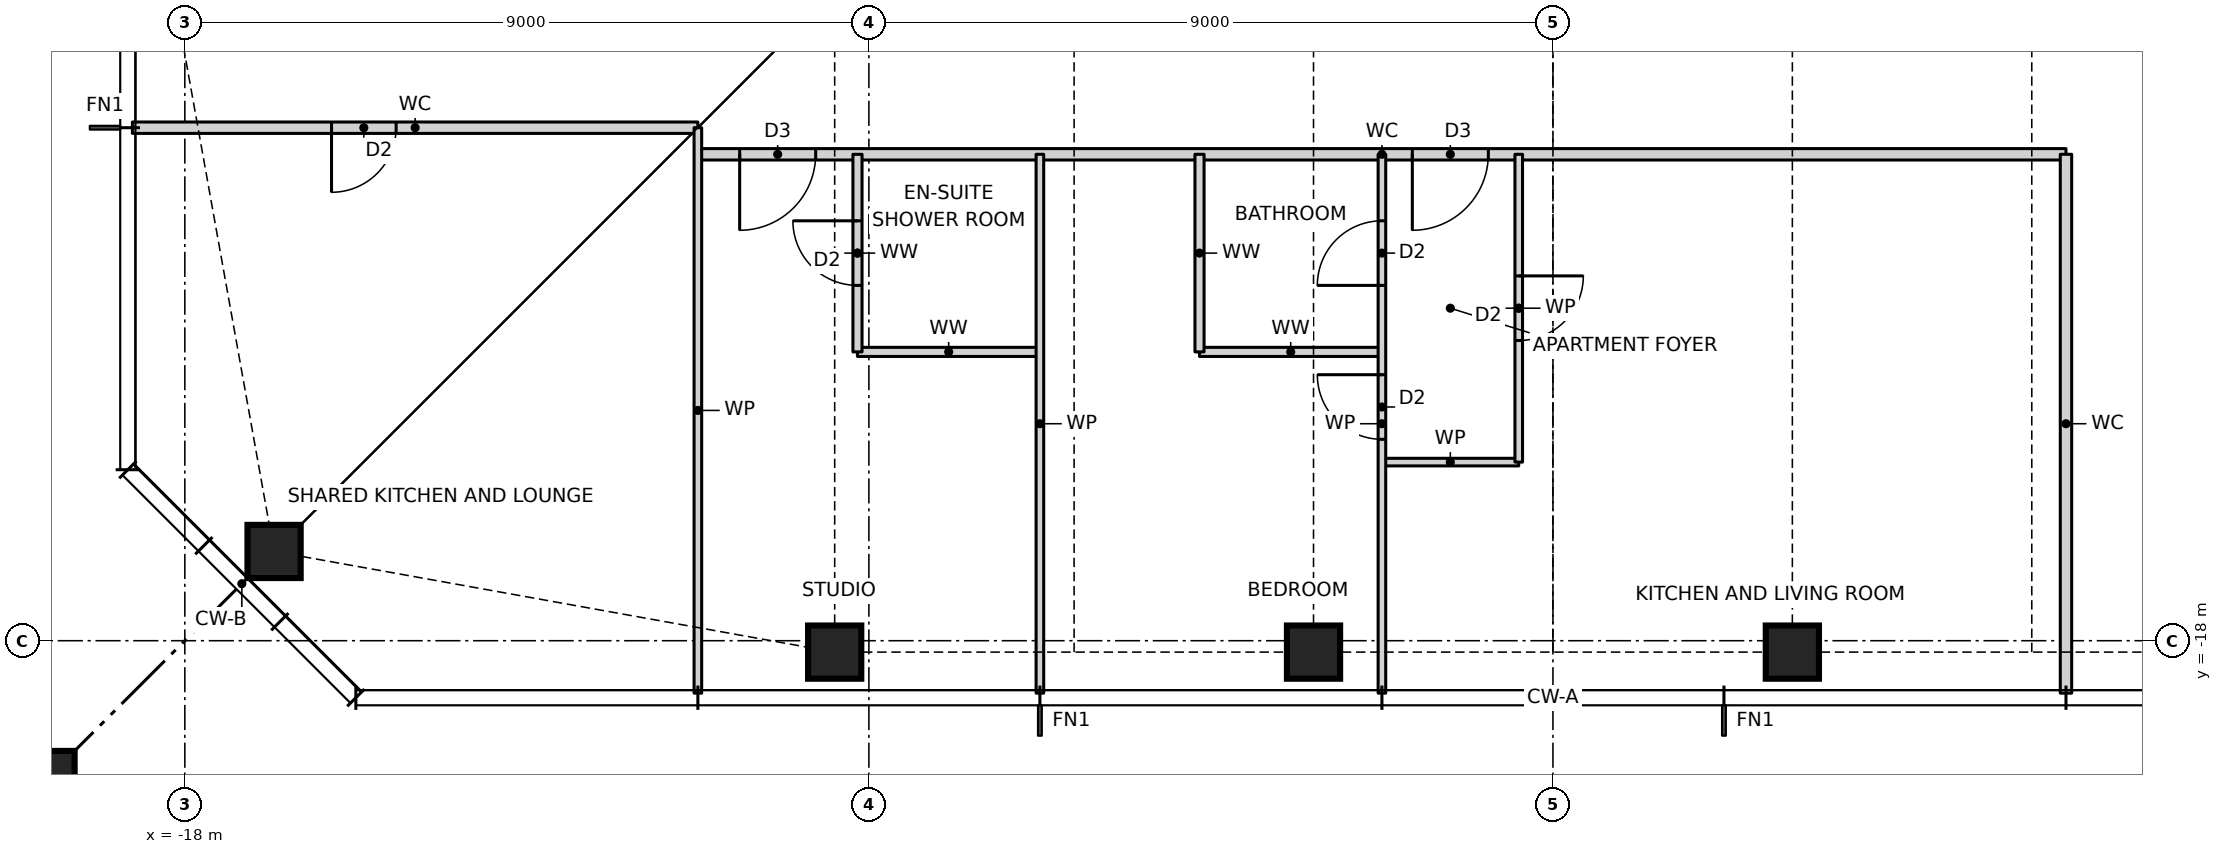
"""IFC4 building model, lengths in metres.
Left out: names, types, materials, properties, quantities, classifications, styles, units other than length and angle.
Written with IfcOpenShell. Run it as: python <this file> out.ifc"""

import sys

from ifc_helpers import new_model, si_unit, direction, frame, frame_2d, origin, origin_2d, place, context, subcontext, project, spatial, rectangle, hollow_rectangle, i_section, extrude, element, fill, save


model = new_model("IFC4")
c1 = context("Model", 3, precision=1e-05, world=origin(), true_north=direction((0.0, 1.0)))
c2 = subcontext(c1, "Body", "Model", "MODEL_VIEW")
j1 = project(units=[si_unit("LENGTHUNIT", "METRE"), si_unit("PLANEANGLEUNIT", "RADIAN")], contexts=[c1])
p1 = place(None, origin())
s1 = spatial("IfcSite", under=j1, at=p1, CompositionType="ELEMENT")
p2 = place(p1, origin())
s2 = spatial("IfcBuilding", under=s1, at=p2, CompositionType="ELEMENT")
p3 = place(p2, frame((0.0, 0.0, 191.5)))
s3 = spatial("IfcBuildingStorey", under=s2, at=p3, CompositionType="ELEMENT", Elevation=191.5)
for number, where, z_axis, x_axis in (
    (1, (-16.826, -16.826, 0.0), (0.0, 0.0, 1.0), (1.0, 0.0, 0.0)),
    (2, (-9.45, -18.15, 0.0), (0.0, 0.0, 1.0), (1.0, 0.0, 0.0)),
    (3, (-3.15, -18.15, 0.0), (0.0, 0.0, 1.0), (1.0, 0.0, 0.0)),
    (4, (3.15, -18.15, 0.0), (0.0, 0.0, 1.0), (1.0, 0.0, 0.0)),
):
    element("IfcColumn", number, at=place(p3, frame(where, z_axis=z_axis, x_axis=x_axis)), inside=s3, PredefinedType="COLUMN", context=c2, shape_type="SweptSolid", body=[
        extrude(hollow_rectangle(XDim=0.7, YDim=0.7, WallThickness=0.06, at=origin_2d()), origin(), (0.0, 0.0, 1.0), 3.5),
    ])
p4 = place(p3, frame((-21.65, -21.65, 0.0), z_axis=(0.0, 0.0, 1.0), x_axis=(1.0, 0.0, 0.0)))
e5 = element("IfcColumn", 5, at=p4, inside=s3, PredefinedType="COLUMN", context=c2, shape_type="SweptSolid", body=[
    extrude(rectangle(XDim=4.4, YDim=4.4, at=origin_2d()), origin(), (0.0, 0.0, 1.0), 3.5),
    extrude(i_section(OverallWidth=0.478, OverallDepth=0.599, WebThickness=0.1, FlangeThickness=0.14, at=origin_2d()), origin(), (0.0, 0.0, 1.0), 3.5),
])
p5 = place(p3, frame((-2.25, -15.65, 0.0), z_axis=(0.0, 0.0, 1.0), x_axis=(1.0, 0.0, 0.0)))
e6 = element("IfcWall", 6, at=p5, inside=s3, PredefinedType="PARTITIONING", context=c2, shape_type="SweptSolid", body=[
    extrude(rectangle(XDim=1.8, YDim=0.1, at=frame_2d((0.9, 0.0))), origin(), (0.0, 0.0, 1.0), 3.27),
])
for number, where, z_axis, x_axis in (
    (7, (-9.15, -14.2, 0.0), (0.0, 0.0, 1.0), (1.0, 0.0, 0.0)),
    (8, (-4.65, -14.2, 0.0), (0.0, 0.0, 1.0), (1.0, 0.0, 0.0)),
):
    element("IfcWall", number, at=place(p3, frame(where, z_axis=z_axis, x_axis=x_axis)), inside=s3, PredefinedType="PARTITIONING", context=c2, shape_type="SweptSolid", body=[
        extrude(rectangle(XDim=2.4, YDim=0.12, at=frame_2d((1.2, 0.0))), origin(), (0.0, 0.0, 1.0), 3.27),
    ])
p6 = place(p3, frame((-11.25, -11.6, 0.0), z_axis=(0.0, 0.0, 1.0), x_axis=(1.0, 0.0, 0.0)))
e9 = element("IfcWall", 9, at=p6, inside=s3, PredefinedType="PARTITIONING", context=c2, shape_type="SweptSolid", body=[
    extrude(rectangle(XDim=18.0, YDim=0.15, at=frame_2d((9.0, 0.0))), origin(), (0.0, 0.0, 1.0), 3.27),
])
p7 = place(p6, frame((0.55, 0.0, 0.0)))
e10 = element("IfcOpeningElement", 10, at=p7, cuts=e9, PredefinedType="OPENING", context=c2, shape_type="SweptSolid", body=[
    extrude(rectangle(XDim=1.0, YDim=2.1, at=frame_2d((0.5, 1.05))), frame((0.0, 0.085, 0.0), z_axis=(0.0, -1.0, 0.0), x_axis=(1.0, 0.0, 0.0)), (0.0, 0.0, 1.0), 0.17),
])
p8 = place(p6, frame((9.4, 0.0, 0.0)))
e11 = element("IfcOpeningElement", 11, at=p8, cuts=e9, PredefinedType="OPENING", context=c2, shape_type="SweptSolid", body=[
    extrude(rectangle(XDim=1.0, YDim=2.1, at=frame_2d((0.5, 1.05))), frame((0.0, 0.085, 0.0), z_axis=(0.0, -1.0, 0.0), x_axis=(1.0, 0.0, 0.0)), (0.0, 0.0, 1.0), 0.17),
])
p9 = place(p3, frame((-18.69, -11.25, 0.0), z_axis=(0.0, 0.0, 1.0), x_axis=(1.0, 0.0, 0.0)))
e12 = element("IfcWall", 12, at=p9, inside=s3, PredefinedType="PARTITIONING", context=c2, shape_type="SweptSolid", body=[
    extrude(rectangle(XDim=7.44, YDim=0.15, at=frame_2d((3.72, 0.0))), origin(), (0.0, 0.0, 1.0), 3.27),
])
p10 = place(p9, frame((2.62, 0.0, 0.0)))
e13 = element("IfcOpeningElement", 13, at=p10, cuts=e12, PredefinedType="OPENING", context=c2, shape_type="SweptSolid", body=[
    extrude(rectangle(XDim=0.85, YDim=2.1, at=frame_2d((0.425, 1.05))), frame((0.0, 0.085, 0.0), z_axis=(0.0, -1.0, 0.0), x_axis=(1.0, 0.0, 0.0)), (0.0, 0.0, 1.0), 0.17),
])
p11 = place(p3, frame((6.75, -18.69, 0.0), z_axis=(0.0, 0.0, 1.0), x_axis=(0.0, 1.0, 0.0)))
e14 = element("IfcWall", 14, at=p11, inside=s3, PredefinedType="PARTITIONING", context=c2, shape_type="SweptSolid", body=[
    extrude(rectangle(XDim=7.09, YDim=0.15, at=frame_2d((3.545, 0.0))), origin(), (0.0, 0.0, 1.0), 3.27),
])
p12 = place(p3, frame((-0.45, -15.65, 0.0), z_axis=(0.0, 0.0, 1.0), x_axis=(0.0, 1.0, 0.0)))
e15 = element("IfcWall", 15, at=p12, inside=s3, PredefinedType="PARTITIONING", context=c2, shape_type="SweptSolid", body=[
    extrude(rectangle(XDim=4.05, YDim=0.1, at=frame_2d((2.025, 0.0))), origin(), (0.0, 0.0, 1.0), 3.27),
])
p13 = place(p12, frame((1.6, 0.0, 0.0)))
e16 = element("IfcOpeningElement", 16, at=p13, cuts=e15, PredefinedType="OPENING", context=c2, shape_type="SweptSolid", body=[
    extrude(rectangle(XDim=0.85, YDim=2.1, at=frame_2d((0.425, 1.05))), frame((0.0, 0.06, 0.0), z_axis=(0.0, -1.0, 0.0), x_axis=(1.0, 0.0, 0.0)), (0.0, 0.0, 1.0), 0.12),
])
p14 = place(p3, frame((-2.25, -18.69, 0.0), z_axis=(0.0, 0.0, 1.0), x_axis=(0.0, 1.0, 0.0)))
e17 = element("IfcWall", 17, at=p14, inside=s3, PredefinedType="PARTITIONING", context=c2, shape_type="SweptSolid", body=[
    extrude(rectangle(XDim=7.09, YDim=0.1, at=frame_2d((3.545, 0.0))), origin(), (0.0, 0.0, 1.0), 3.27),
])
p15 = place(p14, frame((3.34, 0.0, 0.0)))
e18 = element("IfcOpeningElement", 18, at=p15, cuts=e17, PredefinedType="OPENING", context=c2, shape_type="SweptSolid", body=[
    extrude(rectangle(XDim=0.85, YDim=2.1, at=frame_2d((0.425, 1.05))), frame((0.0, 0.06, 0.0), z_axis=(0.0, -1.0, 0.0), x_axis=(1.0, 0.0, 0.0)), (0.0, 0.0, 1.0), 0.12),
])
p16 = place(p14, frame((5.365, 0.0, 0.0)))
e19 = element("IfcOpeningElement", 19, at=p16, cuts=e17, PredefinedType="OPENING", context=c2, shape_type="SweptSolid", body=[
    extrude(rectangle(XDim=0.85, YDim=2.1, at=frame_2d((0.425, 1.05))), frame((0.0, 0.06, 0.0), z_axis=(0.0, -1.0, 0.0), x_axis=(1.0, 0.0, 0.0)), (0.0, 0.0, 1.0), 0.12),
])
p17 = place(p3, frame((-4.65, -14.2, 0.0), z_axis=(0.0, 0.0, 1.0), x_axis=(0.0, 1.0, 0.0)))
e20 = element("IfcWall", 20, at=p17, inside=s3, PredefinedType="PARTITIONING", context=c2, shape_type="SweptSolid", body=[
    extrude(rectangle(XDim=2.6, YDim=0.12, at=frame_2d((1.3, 0.0))), origin(), (0.0, 0.0, 1.0), 3.27),
])
p18 = place(p3, frame((-6.75, -18.69, 0.0), z_axis=(0.0, 0.0, 1.0), x_axis=(0.0, 1.0, 0.0)))
e21 = element("IfcWall", 21, at=p18, inside=s3, PredefinedType="PARTITIONING", context=c2, shape_type="SweptSolid", body=[
    extrude(rectangle(XDim=7.09, YDim=0.1, at=frame_2d((3.545, 0.0))), origin(), (0.0, 0.0, 1.0), 3.27),
])
p19 = place(p3, frame((-9.15, -14.2, 0.0), z_axis=(0.0, 0.0, 1.0), x_axis=(0.0, 1.0, 0.0)))
e22 = element("IfcWall", 22, at=p19, inside=s3, PredefinedType="PARTITIONING", context=c2, shape_type="SweptSolid", body=[
    extrude(rectangle(XDim=2.6, YDim=0.12, at=frame_2d((1.3, 0.0))), origin(), (0.0, 0.0, 1.0), 3.27),
])
p20 = place(p19, frame((0.875, 0.0, 0.0)))
e23 = element("IfcOpeningElement", 23, at=p20, cuts=e22, PredefinedType="OPENING", context=c2, shape_type="SweptSolid", body=[
    extrude(rectangle(XDim=0.85, YDim=2.1, at=frame_2d((0.425, 1.05))), frame((0.0, 0.07, 0.0), z_axis=(0.0, -1.0, 0.0), x_axis=(1.0, 0.0, 0.0)), (0.0, 0.0, 1.0), 0.14),
])
p21 = place(p3, frame((-11.25, -18.69, 0.0), z_axis=(0.0, 0.0, 1.0), x_axis=(0.0, 1.0, 0.0)))
e24 = element("IfcWall", 24, at=p21, inside=s3, PredefinedType="PARTITIONING", context=c2, shape_type="SweptSolid", body=[
    extrude(rectangle(XDim=7.44, YDim=0.1, at=frame_2d((3.72, 0.0))), origin(), (0.0, 0.0, 1.0), 3.27),
])
p22 = place(p7, frame((1.0, 0.0, 0.0), z_axis=(0.0, 0.0, 1.0), x_axis=(-1.0, 0.0, 0.0)))
e25 = element("IfcDoor", 25, at=p22, inside=s3, OperationType="SINGLE_SWING_RIGHT", PredefinedType="DOOR", context=c2, shape_type="SweptSolid", body=[
    extrude(rectangle(XDim=1.0, YDim=2.1, at=frame_2d((0.5, 1.05))), frame((0.0, 0.025, 0.0), z_axis=(0.0, -1.0, 0.0), x_axis=(1.0, 0.0, 0.0)), (0.0, 0.0, 1.0), 0.05),
])
fill(e10, e25)
p23 = place(p20, origin())
e26 = element("IfcDoor", 26, at=p23, inside=s3, OperationType="SINGLE_SWING_RIGHT", PredefinedType="DOOR", context=c2, shape_type="SweptSolid", body=[
    extrude(rectangle(XDim=0.85, YDim=2.1, at=frame_2d((0.425, 1.05))), frame((0.0, 0.025, 0.0), z_axis=(0.0, -1.0, 0.0), x_axis=(1.0, 0.0, 0.0)), (0.0, 0.0, 1.0), 0.05),
])
fill(e23, e26)
p24 = place(p8, frame((1.0, 0.0, 0.0), z_axis=(0.0, 0.0, 1.0), x_axis=(-1.0, 0.0, 0.0)))
e27 = element("IfcDoor", 27, at=p24, inside=s3, OperationType="SINGLE_SWING_RIGHT", PredefinedType="DOOR", context=c2, shape_type="SweptSolid", body=[
    extrude(rectangle(XDim=1.0, YDim=2.1, at=frame_2d((0.5, 1.05))), frame((0.0, 0.025, 0.0), z_axis=(0.0, -1.0, 0.0), x_axis=(1.0, 0.0, 0.0)), (0.0, 0.0, 1.0), 0.05),
])
fill(e11, e27)
p25 = place(p13, frame((0.85, 0.0, 0.0), z_axis=(0.0, 0.0, 1.0), x_axis=(-1.0, 0.0, 0.0)))
e28 = element("IfcDoor", 28, at=p25, inside=s3, OperationType="SINGLE_SWING_LEFT", PredefinedType="DOOR", context=c2, shape_type="SweptSolid", body=[
    extrude(rectangle(XDim=0.85, YDim=2.1, at=frame_2d((0.425, 1.05))), frame((0.0, 0.025, 0.0), z_axis=(0.0, -1.0, 0.0), x_axis=(1.0, 0.0, 0.0)), (0.0, 0.0, 1.0), 0.05),
])
fill(e16, e28)
p26 = place(p15, origin())
e29 = element("IfcDoor", 29, at=p26, inside=s3, OperationType="SINGLE_SWING_RIGHT", PredefinedType="DOOR", context=c2, shape_type="SweptSolid", body=[
    extrude(rectangle(XDim=0.85, YDim=2.1, at=frame_2d((0.425, 1.05))), frame((0.0, 0.025, 0.0), z_axis=(0.0, -1.0, 0.0), x_axis=(1.0, 0.0, 0.0)), (0.0, 0.0, 1.0), 0.05),
])
fill(e18, e29)
p27 = place(p16, origin())
e30 = element("IfcDoor", 30, at=p27, inside=s3, OperationType="SINGLE_SWING_LEFT", PredefinedType="DOOR", context=c2, shape_type="SweptSolid", body=[
    extrude(rectangle(XDim=0.85, YDim=2.1, at=frame_2d((0.425, 1.05))), frame((0.0, 0.025, 0.0), z_axis=(0.0, -1.0, 0.0), x_axis=(1.0, 0.0, 0.0)), (0.0, 0.0, 1.0), 0.05),
])
fill(e19, e30)
p28 = place(p10, frame((0.85, 0.0, 0.0), z_axis=(0.0, 0.0, 1.0), x_axis=(-1.0, 0.0, 0.0)))
e31 = element("IfcDoor", 31, at=p28, inside=s3, OperationType="SINGLE_SWING_RIGHT", PredefinedType="DOOR", context=c2, shape_type="SweptSolid", body=[
    extrude(rectangle(XDim=0.85, YDim=2.1, at=frame_2d((0.425, 1.05))), frame((0.0, 0.025, 0.0), z_axis=(0.0, -1.0, 0.0), x_axis=(1.0, 0.0, 0.0)), (0.0, 0.0, 1.0), 0.05),
])
fill(e13, e31)
save(model, sys.argv[1])
